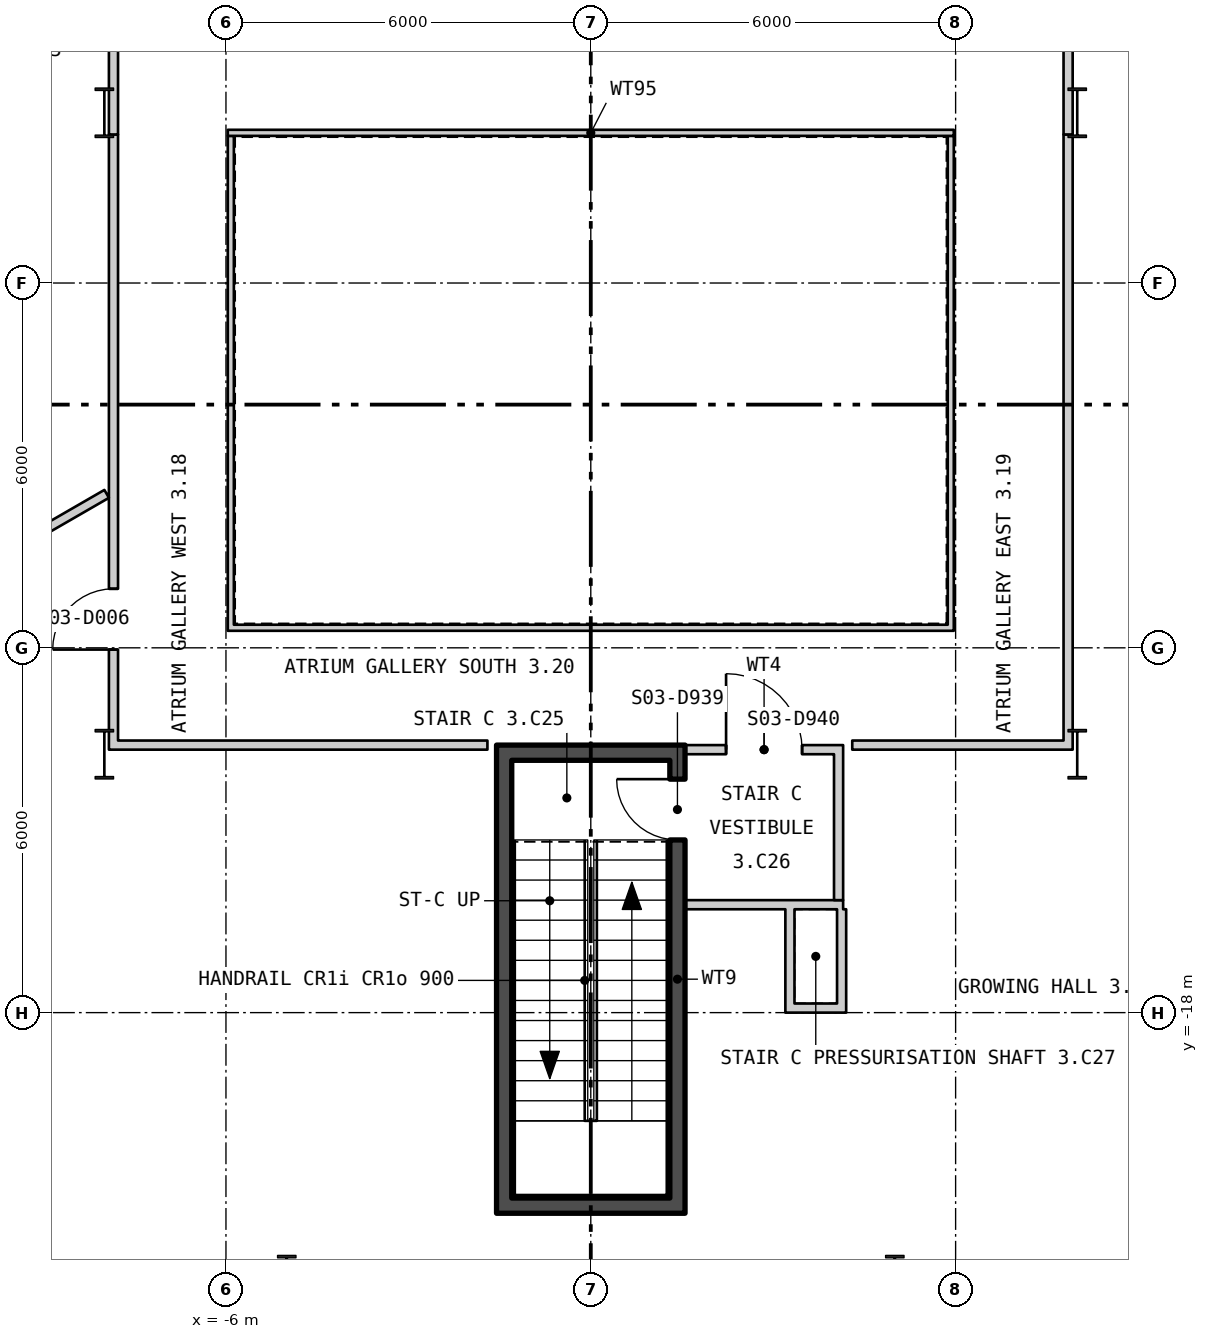
"""IFC4 building model, lengths in metres.
Left out: names, types, materials, properties, quantities, classifications, styles, units other than length and angle.
Written with IfcOpenShell. Run it as: python <this file> out.ifc"""

import sys

from ifc_helpers import new_model, si_unit, direction, frame, frame_2d, origin, origin_2d, place, context, subcontext, project, spatial, polyline, rectangle, i_section, outline, extrude, element, fill, save


model = new_model("IFC4")
c1 = context("Model", 3, precision=1e-05, world=origin(), true_north=direction((0.0, 1.0)))
c2 = subcontext(c1, "Body", "Model", "MODEL_VIEW")
j1 = project(units=[si_unit("LENGTHUNIT", "METRE"), si_unit("PLANEANGLEUNIT", "RADIAN")], contexts=[c1])
p1 = place(None, origin())
s1 = spatial("IfcSite", under=j1, at=p1, CompositionType="ELEMENT")
p2 = place(p1, origin())
s2 = spatial("IfcBuilding", under=s1, at=p2, CompositionType="ELEMENT")
p3 = place(p2, frame((0.0, 0.0, 46.8)))
s3 = spatial("IfcBuildingStorey", under=s2, at=p3, CompositionType="ELEMENT", Elevation=46.8)
for number, where, z_axis, x_axis in (
    (1, (8.0, -3.2, 0.0), (0.0, 0.0, 1.0), (1.0, 0.0, 0.0)),
    (2, (-8.0, -3.2, 0.0), (0.0, 0.0, 1.0), (1.0, 0.0, 0.0)),
    (3, (8.0, -13.75, 0.0), (0.0, 0.0, 1.0), (1.0, 0.0, 0.0)),
    (4, (-8.0, -13.75, 0.0), (0.0, 0.0, 1.0), (1.0, 0.0, 0.0)),
    (5, (5.0, -22.4, 0.0), (0.0, 0.0, 1.0), (1.0, 0.0, 0.0)),
    (6, (-5.0, -22.4, 0.0), (0.0, 0.0, 1.0), (1.0, 0.0, 0.0)),
):
    element("IfcColumn", number, at=place(p3, frame(where, z_axis=z_axis, x_axis=x_axis)), inside=s3, PredefinedType="COLUMN", context=c2, shape_type="SweptSolid", body=[
        extrude(i_section(OverallWidth=0.303, OverallDepth=0.814, WebThickness=0.021, FlangeThickness=0.04, at=origin_2d()), origin(), (0.0, 0.0, 1.0), 4.5),
    ])
p4 = place(p3, frame((-28.445, 10.319, -0.18), z_axis=(0.0, 0.0, 1.0), x_axis=(0.499999764979, -0.866025539474, 0.0)))
e7 = element("IfcWall", 7, at=p4, inside=s3, PredefinedType="SOLIDWALL", context=c2, shape_type="SweptSolid", body=[
    extrude(outline(polyline([(-0.13, -0.225), (45.87, -0.225), (45.61, 0.225), (0.13, 0.225), (-0.13, -0.225)])), origin(), (0.0, 0.0, 1.0), 4.28),
])
p5 = place(p4, frame((1.424, 0.0, 1.08)))
e8 = element("IfcOpeningElement", 8, at=p5, cuts=e7, PredefinedType="OPENING", context=c2, shape_type="SweptSolid", body=[
    extrude(rectangle(XDim=2.4, YDim=2.6, at=frame_2d((1.2, 1.3))), frame((0.0, 0.235, 0.0), z_axis=(0.0, -1.0, 0.0), x_axis=(1.0, 0.0, 0.0)), (0.0, 0.0, 1.0), 0.47),
])
p6 = place(p4, frame((5.893, 0.0, 1.08)))
e9 = element("IfcOpeningElement", 9, at=p6, cuts=e7, PredefinedType="OPENING", context=c2, shape_type="SweptSolid", body=[
    extrude(rectangle(XDim=2.4, YDim=2.6, at=frame_2d((1.2, 1.3))), frame((0.0, 0.235, 0.0), z_axis=(0.0, -1.0, 0.0), x_axis=(1.0, 0.0, 0.0)), (0.0, 0.0, 1.0), 0.47),
])
p7 = place(p4, frame((10.401, 0.0, 1.08)))
e10 = element("IfcOpeningElement", 10, at=p7, cuts=e7, PredefinedType="OPENING", context=c2, shape_type="SweptSolid", body=[
    extrude(rectangle(XDim=2.4, YDim=2.6, at=frame_2d((1.2, 1.3))), frame((0.0, 0.235, 0.0), z_axis=(0.0, -1.0, 0.0), x_axis=(1.0, 0.0, 0.0)), (0.0, 0.0, 1.0), 0.47),
])
p8 = place(p4, frame((14.909, 0.0, 1.08)))
e11 = element("IfcOpeningElement", 11, at=p8, cuts=e7, PredefinedType="OPENING", context=c2, shape_type="SweptSolid", body=[
    extrude(rectangle(XDim=2.4, YDim=2.6, at=frame_2d((1.2, 1.3))), frame((0.0, 0.235, 0.0), z_axis=(0.0, -1.0, 0.0), x_axis=(1.0, 0.0, 0.0)), (0.0, 0.0, 1.0), 0.47),
])
p9 = place(p4, frame((19.416, 0.0, 1.08)))
e12 = element("IfcOpeningElement", 12, at=p9, cuts=e7, PredefinedType="OPENING", context=c2, shape_type="SweptSolid", body=[
    extrude(rectangle(XDim=2.4, YDim=2.6, at=frame_2d((1.2, 1.3))), frame((0.0, 0.235, 0.0), z_axis=(0.0, -1.0, 0.0), x_axis=(1.0, 0.0, 0.0)), (0.0, 0.0, 1.0), 0.47),
])
p10 = place(p4, frame((23.924, 0.0, 1.08)))
e13 = element("IfcOpeningElement", 13, at=p10, cuts=e7, PredefinedType="OPENING", context=c2, shape_type="SweptSolid", body=[
    extrude(rectangle(XDim=2.4, YDim=2.6, at=frame_2d((1.2, 1.3))), frame((0.0, 0.235, 0.0), z_axis=(0.0, -1.0, 0.0), x_axis=(1.0, 0.0, 0.0)), (0.0, 0.0, 1.0), 0.47),
])
p11 = place(p4, frame((28.431, 0.0, 1.08)))
e14 = element("IfcOpeningElement", 14, at=p11, cuts=e7, PredefinedType="OPENING", context=c2, shape_type="SweptSolid", body=[
    extrude(rectangle(XDim=2.4, YDim=2.6, at=frame_2d((1.2, 1.3))), frame((0.0, 0.235, 0.0), z_axis=(0.0, -1.0, 0.0), x_axis=(1.0, 0.0, 0.0)), (0.0, 0.0, 1.0), 0.47),
])
p12 = place(p4, frame((32.939, 0.0, 1.08)))
e15 = element("IfcOpeningElement", 15, at=p12, cuts=e7, PredefinedType="OPENING", context=c2, shape_type="SweptSolid", body=[
    extrude(rectangle(XDim=2.4, YDim=2.6, at=frame_2d((1.2, 1.3))), frame((0.0, 0.235, 0.0), z_axis=(0.0, -1.0, 0.0), x_axis=(1.0, 0.0, 0.0)), (0.0, 0.0, 1.0), 0.47),
])
p13 = place(p4, frame((37.447, 0.0, 1.08)))
e16 = element("IfcOpeningElement", 16, at=p13, cuts=e7, PredefinedType="OPENING", context=c2, shape_type="SweptSolid", body=[
    extrude(rectangle(XDim=2.4, YDim=2.6, at=frame_2d((1.2, 1.3))), frame((0.0, 0.235, 0.0), z_axis=(0.0, -1.0, 0.0), x_axis=(1.0, 0.0, 0.0)), (0.0, 0.0, 1.0), 0.47),
])
p14 = place(p4, frame((41.916, 0.0, 1.08)))
e17 = element("IfcOpeningElement", 17, at=p14, cuts=e7, PredefinedType="OPENING", context=c2, shape_type="SweptSolid", body=[
    extrude(rectangle(XDim=2.4, YDim=2.6, at=frame_2d((1.2, 1.3))), frame((0.0, 0.235, 0.0), z_axis=(0.0, -1.0, 0.0), x_axis=(1.0, 0.0, 0.0)), (0.0, 0.0, 1.0), 0.47),
])
p15 = place(p3, frame((5.575, -29.294, -0.18), z_axis=(0.0, 0.0, 1.0), x_axis=(0.499999764979, 0.866025539474, 0.0)))
e18 = element("IfcWall", 18, at=p15, inside=s3, PredefinedType="SOLIDWALL", context=c2, shape_type="SweptSolid", body=[
    extrude(outline(polyline([(-0.13, -0.225), (45.87, -0.225), (45.61, 0.225), (0.13, 0.225), (-0.13, -0.225)])), origin(), (0.0, 0.0, 1.0), 4.28),
])
p16 = place(p15, frame((1.424, 0.0, 1.08)))
e19 = element("IfcOpeningElement", 19, at=p16, cuts=e18, PredefinedType="OPENING", context=c2, shape_type="SweptSolid", body=[
    extrude(rectangle(XDim=2.4, YDim=2.6, at=frame_2d((1.2, 1.3))), frame((0.0, 0.235, 0.0), z_axis=(0.0, -1.0, 0.0), x_axis=(1.0, 0.0, 0.0)), (0.0, 0.0, 1.0), 0.47),
])
p17 = place(p15, frame((5.893, 0.0, 1.08)))
e20 = element("IfcOpeningElement", 20, at=p17, cuts=e18, PredefinedType="OPENING", context=c2, shape_type="SweptSolid", body=[
    extrude(rectangle(XDim=2.4, YDim=2.6, at=frame_2d((1.2, 1.3))), frame((0.0, 0.235, 0.0), z_axis=(0.0, -1.0, 0.0), x_axis=(1.0, 0.0, 0.0)), (0.0, 0.0, 1.0), 0.47),
])
p18 = place(p15, frame((10.401, 0.0, 1.08)))
e21 = element("IfcOpeningElement", 21, at=p18, cuts=e18, PredefinedType="OPENING", context=c2, shape_type="SweptSolid", body=[
    extrude(rectangle(XDim=2.4, YDim=2.6, at=frame_2d((1.2, 1.3))), frame((0.0, 0.235, 0.0), z_axis=(0.0, -1.0, 0.0), x_axis=(1.0, 0.0, 0.0)), (0.0, 0.0, 1.0), 0.47),
])
p19 = place(p15, frame((14.909, 0.0, 1.08)))
e22 = element("IfcOpeningElement", 22, at=p19, cuts=e18, PredefinedType="OPENING", context=c2, shape_type="SweptSolid", body=[
    extrude(rectangle(XDim=2.4, YDim=2.6, at=frame_2d((1.2, 1.3))), frame((0.0, 0.235, 0.0), z_axis=(0.0, -1.0, 0.0), x_axis=(1.0, 0.0, 0.0)), (0.0, 0.0, 1.0), 0.47),
])
p20 = place(p15, frame((19.416, 0.0, 1.08)))
e23 = element("IfcOpeningElement", 23, at=p20, cuts=e18, PredefinedType="OPENING", context=c2, shape_type="SweptSolid", body=[
    extrude(rectangle(XDim=2.4, YDim=2.6, at=frame_2d((1.2, 1.3))), frame((0.0, 0.235, 0.0), z_axis=(0.0, -1.0, 0.0), x_axis=(1.0, 0.0, 0.0)), (0.0, 0.0, 1.0), 0.47),
])
p21 = place(p15, frame((23.924, 0.0, 1.08)))
e24 = element("IfcOpeningElement", 24, at=p21, cuts=e18, PredefinedType="OPENING", context=c2, shape_type="SweptSolid", body=[
    extrude(rectangle(XDim=2.4, YDim=2.6, at=frame_2d((1.2, 1.3))), frame((0.0, 0.235, 0.0), z_axis=(0.0, -1.0, 0.0), x_axis=(1.0, 0.0, 0.0)), (0.0, 0.0, 1.0), 0.47),
])
p22 = place(p15, frame((37.447, 0.0, 1.08)))
e25 = element("IfcOpeningElement", 25, at=p22, cuts=e18, PredefinedType="OPENING", context=c2, shape_type="SweptSolid", body=[
    extrude(rectangle(XDim=2.4, YDim=2.6, at=frame_2d((1.2, 1.3))), frame((0.0, 0.235, 0.0), z_axis=(0.0, -1.0, 0.0), x_axis=(1.0, 0.0, 0.0)), (0.0, 0.0, 1.0), 0.47),
])
p23 = place(p15, frame((41.916, 0.0, 1.08)))
e26 = element("IfcOpeningElement", 26, at=p23, cuts=e18, PredefinedType="OPENING", context=c2, shape_type="SweptSolid", body=[
    extrude(rectangle(XDim=2.4, YDim=2.6, at=frame_2d((1.2, 1.3))), frame((0.0, 0.235, 0.0), z_axis=(0.0, -1.0, 0.0), x_axis=(1.0, 0.0, 0.0)), (0.0, 0.0, 1.0), 0.47),
])
p24 = place(p3, frame((-5.97, -11.67, 0.0), z_axis=(0.0, 0.0, 1.0), x_axis=(1.0, 0.0, 0.0)))
e27 = element("IfcWall", 27, at=p24, inside=s3, PredefinedType="PARTITIONING", context=c2, shape_type="SweptSolid", body=[
    extrude(rectangle(XDim=11.94, YDim=0.1, at=frame_2d((5.97, 0.0))), origin(), (0.0, 0.0, 1.0), 4.3),
])
p25 = place(p3, frame((5.92, -11.62, 0.0), z_axis=(0.0, 0.0, 1.0), x_axis=(0.0, 1.0, 0.0)))
e28 = element("IfcWall", 28, at=p25, inside=s3, PredefinedType="PARTITIONING", context=c2, shape_type="SweptSolid", body=[
    extrude(rectangle(XDim=8.04, YDim=0.1, at=frame_2d((4.02, 0.0))), origin(), (0.0, 0.0, 1.0), 4.3),
])
p26 = place(p3, frame((5.97, -3.53, 0.0), z_axis=(0.0, 0.0, 1.0), x_axis=(-1.0, 0.0, 0.0)))
e29 = element("IfcWall", 29, at=p26, inside=s3, PredefinedType="PARTITIONING", context=c2, shape_type="SweptSolid", body=[
    extrude(rectangle(XDim=11.94, YDim=0.1, at=frame_2d((5.97, 0.0))), origin(), (0.0, 0.0, 1.0), 4.3),
])
p27 = place(p3, frame((-5.92, -3.58, 0.0), z_axis=(0.0, 0.0, 1.0), x_axis=(0.0, -1.0, 0.0)))
e30 = element("IfcWall", 30, at=p27, inside=s3, PredefinedType="PARTITIONING", context=c2, shape_type="SweptSolid", body=[
    extrude(rectangle(XDim=8.04, YDim=0.1, at=frame_2d((4.02, 0.0))), origin(), (0.0, 0.0, 1.0), 4.3),
])
p28 = place(p3, frame((-1.425, -21.05, 0.0), z_axis=(0.0, 0.0, 1.0), x_axis=(0.0, 1.0, 0.0)))
e31 = element("IfcWall", 31, at=p28, inside=s3, PredefinedType="SHEAR", context=c2, shape_type="SweptSolid", body=[
    extrude(rectangle(XDim=7.2, YDim=0.25, at=frame_2d((3.6, 0.0))), origin(), (0.0, 0.0, 1.0), 4.3),
])
p29 = place(p3, frame((1.425, -21.05, 0.0), z_axis=(0.0, 0.0, 1.0), x_axis=(0.0, 1.0, 0.0)))
e32 = element("IfcWall", 32, at=p29, inside=s3, PredefinedType="SHEAR", context=c2, shape_type="SweptSolid", body=[
    extrude(rectangle(XDim=7.2, YDim=0.25, at=frame_2d((3.6, 0.0))), origin(), (0.0, 0.0, 1.0), 4.3),
])
p30 = place(p29, frame((5.89, 0.0, 0.0)))
e33 = element("IfcOpeningElement", 33, at=p30, cuts=e32, PredefinedType="OPENING", context=c2, shape_type="SweptSolid", body=[
    extrude(rectangle(XDim=1.0, YDim=2.1, at=frame_2d((0.5, 1.05))), frame((0.0, 0.135, 0.0), z_axis=(0.0, -1.0, 0.0), x_axis=(1.0, 0.0, 0.0)), (0.0, 0.0, 1.0), 0.27),
])
for number, where, z_axis, x_axis in (
    (34, (-1.55, -21.175, 0.0), (0.0, 0.0, 1.0), (1.0, 0.0, 0.0)),
    (35, (-1.55, -13.725, 0.0), (0.0, 0.0, 1.0), (1.0, 0.0, 0.0)),
):
    element("IfcWall", number, at=place(p3, frame(where, z_axis=z_axis, x_axis=x_axis)), inside=s3, PredefinedType="SHEAR", context=c2, shape_type="SweptSolid", body=[
        extrude(rectangle(XDim=3.1, YDim=0.25, at=frame_2d((1.55, 0.0))), origin(), (0.0, 0.0, 1.0), 4.3),
    ])
p31 = place(p3, frame((1.55, -16.225, 0.0), z_axis=(0.0, 0.0, 1.0), x_axis=(1.0, 0.0, 0.0)))
e36 = element("IfcWall", 36, at=p31, inside=s3, PredefinedType="PARTITIONING", context=c2, shape_type="SweptSolid", body=[
    extrude(rectangle(XDim=2.6, YDim=0.15, at=frame_2d((1.3, 0.0))), origin(), (0.0, 0.0, 1.0), 4.3),
])
p32 = place(p3, frame((4.075, -16.15, 0.0), z_axis=(0.0, 0.0, 1.0), x_axis=(0.0, 1.0, 0.0)))
e37 = element("IfcWall", 37, at=p32, inside=s3, PredefinedType="PARTITIONING", context=c2, shape_type="SweptSolid", body=[
    extrude(rectangle(XDim=2.4, YDim=0.15, at=frame_2d((1.2, 0.0))), origin(), (0.0, 0.0, 1.0), 4.3),
])
p33 = place(p3, frame((1.55, -13.675, 0.0), z_axis=(0.0, 0.0, 1.0), x_axis=(1.0, 0.0, 0.0)))
e38 = element("IfcWall", 38, at=p33, inside=s3, PredefinedType="PARTITIONING", context=c2, shape_type="SweptSolid", body=[
    extrude(rectangle(XDim=2.6, YDim=0.15, at=frame_2d((1.3, 0.0))), origin(), (0.0, 0.0, 1.0), 3.39),
])
p34 = place(p33, frame((0.675, 0.0, 0.0)))
e39 = element("IfcOpeningElement", 39, at=p34, cuts=e38, PredefinedType="OPENING", context=c2, shape_type="SweptSolid", body=[
    extrude(rectangle(XDim=1.25, YDim=2.1, at=frame_2d((0.625, 1.05))), frame((0.0, 0.085, 0.0), z_axis=(0.0, -1.0, 0.0), x_axis=(1.0, 0.0, 0.0)), (0.0, 0.0, 1.0), 0.17),
])
p35 = place(p3, frame((3.275, -18.0, 0.0), z_axis=(0.0, 0.0, 1.0), x_axis=(0.0, 1.0, 0.0)))
e40 = element("IfcWall", 40, at=p35, inside=s3, PredefinedType="PARTITIONING", context=c2, shape_type="SweptSolid", body=[
    extrude(rectangle(XDim=1.7, YDim=0.15, at=frame_2d((0.85, 0.0))), origin(), (0.0, 0.0, 1.0), 3.7),
])
p36 = place(p3, frame((3.35, -17.925, 0.0), z_axis=(0.0, 0.0, 1.0), x_axis=(1.0, 0.0, 0.0)))
e41 = element("IfcWall", 41, at=p36, inside=s3, PredefinedType="PARTITIONING", context=c2, shape_type="SweptSolid", body=[
    extrude(rectangle(XDim=0.7, YDim=0.15, at=frame_2d((0.35, 0.0))), origin(), (0.0, 0.0, 1.0), 4.3),
])
p37 = place(p3, frame((4.125, -18.0, 0.0), z_axis=(0.0, 0.0, 1.0), x_axis=(0.0, 1.0, 0.0)))
e42 = element("IfcWall", 42, at=p37, inside=s3, PredefinedType="PARTITIONING", context=c2, shape_type="SweptSolid", body=[
    extrude(rectangle(XDim=1.7, YDim=0.15, at=frame_2d((0.85, 0.0))), origin(), (0.0, 0.0, 1.0), 4.3),
])
p38 = place(p3, frame((-14.172, -13.053, 0.0), z_axis=(0.0, 0.0, 1.0), x_axis=(0.866046247233, 0.49996389635, 0.0)))
e43 = element("IfcWall", 43, at=p38, inside=s3, PredefinedType="PARTITIONING", context=c2, shape_type="SweptSolid", body=[
    extrude(rectangle(XDim=7.17, YDim=0.15, at=frame_2d((3.585, 0.0))), origin(), (0.0, 0.0, 1.0), 4.3),
])
p39 = place(p3, frame((-7.85, -13.675, 0.0), z_axis=(0.0, 0.0, 1.0), x_axis=(0.0, 1.0, 0.0)))
e44 = element("IfcWall", 44, at=p39, inside=s3, PredefinedType="PARTITIONING", context=c2, shape_type="SweptSolid", body=[
    extrude(rectangle(XDim=10.118, YDim=0.15, at=frame_2d((5.059, 0.0))), origin(), (0.0, 0.0, 1.0), 3.61),
])
p40 = place(p39, frame((1.646, 0.0, 0.0)))
e45 = element("IfcOpeningElement", 45, at=p40, cuts=e44, PredefinedType="OPENING", context=c2, shape_type="SweptSolid", body=[
    extrude(rectangle(XDim=1.0, YDim=2.1, at=frame_2d((0.5, 1.05))), frame((0.0, 0.085, 0.0), z_axis=(0.0, -1.0, 0.0), x_axis=(1.0, 0.0, 0.0)), (0.0, 0.0, 1.0), 0.17),
])
p41 = place(p3, frame((-7.85, -3.557, 0.0), z_axis=(0.0, 0.0, 1.0), x_axis=(0.0, 1.0, 0.0)))
e46 = element("IfcWall", 46, at=p41, inside=s3, PredefinedType="PARTITIONING", context=c2, shape_type="SweptSolid", body=[
    extrude(rectangle(XDim=1.754, YDim=0.15, at=frame_2d((0.877, 0.0))), origin(), (0.0, 0.0, 1.0), 4.3),
])
p42 = place(p3, frame((-7.775, -13.6, 0.0), z_axis=(0.0, 0.0, 1.0), x_axis=(1.0, 0.0, 0.0)))
e47 = element("IfcWall", 47, at=p42, inside=s3, PredefinedType="PARTITIONING", context=c2, shape_type="SweptSolid", body=[
    extrude(rectangle(XDim=6.075, YDim=0.15, at=frame_2d((3.038, 0.0))), origin(), (0.0, 0.0, 1.0), 3.39),
])
p43 = place(p3, frame((4.3, -13.6, 0.0), z_axis=(0.0, 0.0, 1.0), x_axis=(1.0, 0.0, 0.0)))
e48 = element("IfcWall", 48, at=p43, inside=s3, PredefinedType="PARTITIONING", context=c2, shape_type="SweptSolid", body=[
    extrude(rectangle(XDim=3.475, YDim=0.15, at=frame_2d((1.738, 0.0))), origin(), (0.0, 0.0, 1.0), 3.39),
])
p44 = place(p3, frame((7.85, -13.675, 0.0), z_axis=(0.0, 0.0, 1.0), x_axis=(0.0, 1.0, 0.0)))
e49 = element("IfcWall", 49, at=p44, inside=s3, PredefinedType="PARTITIONING", context=c2, shape_type="SweptSolid", body=[
    extrude(rectangle(XDim=10.118, YDim=0.15, at=frame_2d((5.059, 0.0))), origin(), (0.0, 0.0, 1.0), 3.61),
])
p45 = place(p3, frame((7.85, -3.557, 0.0), z_axis=(0.0, 0.0, 1.0), x_axis=(0.0, 1.0, 0.0)))
e50 = element("IfcWall", 50, at=p45, inside=s3, PredefinedType="PARTITIONING", context=c2, shape_type="SweptSolid", body=[
    extrude(rectangle(XDim=1.769, YDim=0.15, at=frame_2d((0.884, 0.0))), origin(), (0.0, 0.0, 1.0), 4.3),
])
p46 = place(p30, origin())
e51 = element("IfcDoor", 51, at=p46, inside=s3, OperationType="SINGLE_SWING_LEFT", PredefinedType="DOOR", context=c2, shape_type="SweptSolid", body=[
    extrude(rectangle(XDim=1.0, YDim=2.1, at=frame_2d((0.5, 1.05))), frame((0.0, 0.025, 0.0), z_axis=(0.0, -1.0, 0.0), x_axis=(1.0, 0.0, 0.0)), (0.0, 0.0, 1.0), 0.05),
])
fill(e33, e51)
p47 = place(p34, origin())
e52 = element("IfcDoor", 52, at=p47, inside=s3, OperationType="SINGLE_SWING_RIGHT", PredefinedType="DOOR", context=c2, shape_type="SweptSolid", body=[
    extrude(rectangle(XDim=1.25, YDim=2.1, at=frame_2d((0.625, 1.05))), frame((0.0, 0.025, 0.0), z_axis=(0.0, -1.0, 0.0), x_axis=(1.0, 0.0, 0.0)), (0.0, 0.0, 1.0), 0.05),
])
fill(e39, e52)
p48 = place(p40, origin())
e53 = element("IfcDoor", 53, at=p48, inside=s3, OperationType="SINGLE_SWING_RIGHT", PredefinedType="DOOR", context=c2, shape_type="SweptSolid", body=[
    extrude(rectangle(XDim=1.0, YDim=2.1, at=frame_2d((0.5, 1.05))), frame((0.0, 0.025, 0.0), z_axis=(0.0, -1.0, 0.0), x_axis=(1.0, 0.0, 0.0)), (0.0, 0.0, 1.0), 0.05),
])
fill(e45, e53)
save(model, sys.argv[1])
